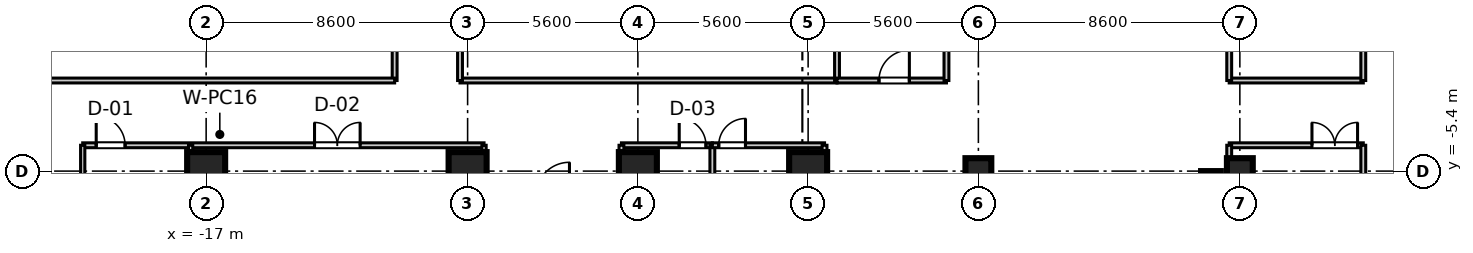
"""IFC4 building model, lengths in metres.
Left out: names, types, materials, properties, quantities, classifications, styles, units other than length and angle.
Written with IfcOpenShell. Run it as: python <this file> out.ifc"""

import sys

from ifc_helpers import new_model, si_unit, direction, frame, frame_2d, origin, origin_2d, place, context, subcontext, project, spatial, rectangle, extrude, source, transform, mapped, element, fill, save


model = new_model("IFC4")
c1 = context("Model", 3, precision=1e-05, world=origin(), true_north=direction((0.0, 1.0)))
c2 = subcontext(c1, "Body", "Model", "MODEL_VIEW")
j1 = project(units=[si_unit("LENGTHUNIT", "METRE"), si_unit("PLANEANGLEUNIT", "RADIAN")], contexts=[c1])
p1 = place(None, origin())
s1 = spatial("IfcSite", under=j1, at=p1, CompositionType="ELEMENT")
p2 = place(p1, origin())
s2 = spatial("IfcBuilding", under=s1, at=p2, CompositionType="ELEMENT")
p3 = place(p2, frame((0.0, 0.0, 110.2)))
s3 = spatial("IfcBuildingStorey", under=s2, at=p3, CompositionType="ELEMENT", Elevation=110.2)
m1 = source(origin(), c2, "Body", "SweptSolid", [
    extrude(rectangle(XDim=1.25, YDim=1.25, at=origin_2d()), origin(), (0.0, 0.0, 1.0), 3.605),
])
for number, where, z_axis, x_axis in (
    (1, (-17.0, -5.4, 0.0), (0.0, 0.0, 1.0), (1.0, 0.0, 0.0)),
    (2, (-8.4, -5.4, 0.0), (0.0, 0.0, 1.0), (1.0, 0.0, 0.0)),
    (3, (-2.8, -5.4, 0.0), (0.0, 0.0, 1.0), (1.0, 0.0, 0.0)),
    (4, (2.8, -5.4, 0.0), (0.0, 0.0, 1.0), (1.0, 0.0, 0.0)),
):
    element("IfcColumn", number, at=place(p3, frame(where, z_axis=z_axis, x_axis=x_axis)), inside=s3, PredefinedType="COLUMN", context=c2, shape_type="MappedRepresentation", body=[
        mapped(m1, transform((0.0, 0.0, 0.0), scale=1.0)),
    ])
m2 = source(origin(), c2, "Body", "SweptSolid", [
    extrude(rectangle(XDim=0.85, YDim=0.85, at=origin_2d()), origin(), (0.0, 0.0, 1.0), 3.605),
])
for number, where, z_axis, x_axis in (
    (5, (8.4, -5.4, 0.0), (0.0, 0.0, 1.0), (1.0, 0.0, 0.0)),
    (6, (17.0, -5.4, 0.0), (0.0, 0.0, 1.0), (1.0, 0.0, 0.0)),
):
    element("IfcColumn", number, at=place(p3, frame(where, z_axis=z_axis, x_axis=x_axis)), inside=s3, PredefinedType="PILASTER", context=c2, shape_type="MappedRepresentation", body=[
        mapped(m2, transform((0.0, 0.0, 0.0), scale=1.0)),
    ])
m3 = source(origin(), c2, "Body", "SweptSolid", [
    extrude(rectangle(XDim=11.6, YDim=0.65, at=frame_2d((5.8, 0.0))), origin(), (0.0, 0.0, 1.0), 3.38),
])
p4 = place(p3, frame((16.05, -17.0, 0.0), z_axis=(0.0, 0.0, 1.0), x_axis=(0.0, 1.0, 0.0)))
e7 = element("IfcWall", 7, at=p4, inside=s3, PredefinedType="SHEAR", context=c2, shape_type="MappedRepresentation", body=[
    mapped(m3, transform((0.0, 0.0, 0.0), scale=1.0)),
])
m4 = source(origin(), c2, "Body", "SweptSolid", [
    extrude(rectangle(XDim=4.41, YDim=0.16, at=frame_2d((2.205, 0.0))), origin(), (0.0, 0.0, 1.0), 2.72),
])
p5 = place(p3, frame((16.65, -4.55, 0.0), z_axis=(0.0, 0.0, 1.0), x_axis=(1.0, 0.0, 0.0)))
e8 = element("IfcWall", 8, at=p5, inside=s3, PredefinedType="PARTITIONING", context=c2, shape_type="MappedRepresentation", body=[
    mapped(m4, transform((0.0, 0.0, 0.0), scale=1.0)),
])
p6 = place(p5, frame((2.722, 0.0, 0.0)))
e9 = element("IfcOpeningElement", 9, at=p6, cuts=e8, PredefinedType="OPENING", context=c2, shape_type="SweptSolid", body=[
    extrude(rectangle(XDim=1.5, YDim=2.15, at=frame_2d((0.75, 1.075))), frame((0.0, 0.09, 0.0), z_axis=(0.0, -1.0, 0.0), x_axis=(1.0, 0.0, 0.0)), (0.0, 0.0, 1.0), 0.18),
])
m5 = source(origin(), c2, "Body", "SweptSolid", [
    extrude(rectangle(XDim=19.25, YDim=0.16, at=frame_2d((9.625, 0.0))), origin(), (0.0, 0.0, 1.0), 2.72),
])
p7 = place(p3, frame((16.65, -23.8, 0.0), z_axis=(0.0, 0.0, 1.0), x_axis=(0.0, 1.0, 0.0)))
e10 = element("IfcWall", 10, at=p7, inside=s3, PredefinedType="PARTITIONING", context=c2, shape_type="MappedRepresentation", body=[
    mapped(m5, transform((0.0, 0.0, 0.0), scale=1.0)),
])
m6 = source(origin(), c2, "Body", "SweptSolid", [
    extrude(rectangle(XDim=17.83, YDim=0.16, at=frame_2d((8.915, 0.0))), origin(), (0.0, 0.0, 1.0), 2.72),
])
p8 = place(p3, frame((21.06, -22.38, 0.0), z_axis=(0.0, 0.0, 1.0), x_axis=(0.0, 1.0, 0.0)))
e11 = element("IfcWall", 11, at=p8, inside=s3, PredefinedType="PARTITIONING", context=c2, shape_type="MappedRepresentation", body=[
    mapped(m6, transform((0.0, 0.0, 0.0), scale=1.0)),
])
m7 = source(origin(), c2, "Body", "SweptSolid", [
    extrude(rectangle(XDim=13.2, YDim=0.16, at=frame_2d((6.6, 0.0))), origin(), (0.0, 0.0, 1.0), 2.72),
])
p9 = place(p3, frame((-21.06, -4.55, 0.0), z_axis=(0.0, 0.0, 1.0), x_axis=(1.0, 0.0, 0.0)))
e12 = element("IfcWall", 12, at=p9, inside=s3, PredefinedType="PARTITIONING", context=c2, shape_type="MappedRepresentation", body=[
    mapped(m7, transform((0.0, 0.0, 0.0), scale=1.0)),
])
p10 = place(p9, frame((0.444, 0.0, 0.0)))
e13 = element("IfcOpeningElement", 13, at=p10, cuts=e12, PredefinedType="OPENING", context=c2, shape_type="SweptSolid", body=[
    extrude(rectangle(XDim=0.95, YDim=2.1, at=frame_2d((0.475, 1.05))), frame((0.0, 0.09, 0.0), z_axis=(0.0, -1.0, 0.0), x_axis=(1.0, 0.0, 0.0)), (0.0, 0.0, 1.0), 0.18),
])
p11 = place(p9, frame((7.625, 0.0, 0.0)))
e14 = element("IfcOpeningElement", 14, at=p11, cuts=e12, PredefinedType="OPENING", context=c2, shape_type="SweptSolid", body=[
    extrude(rectangle(XDim=1.5, YDim=2.15, at=frame_2d((0.75, 1.075))), frame((0.0, 0.09, 0.0), z_axis=(0.0, -1.0, 0.0), x_axis=(1.0, 0.0, 0.0)), (0.0, 0.0, 1.0), 0.18),
])
m8 = source(origin(), c2, "Body", "SweptSolid", [
    extrude(rectangle(XDim=17.83, YDim=0.14, at=frame_2d((8.915, 0.0))), origin(), (0.0, 0.0, 1.0), 2.72),
])
p12 = place(p3, frame((-21.06, -22.38, 0.0), z_axis=(0.0, 0.0, 1.0), x_axis=(0.0, 1.0, 0.0)))
e15 = element("IfcWall", 15, at=p12, inside=s3, PredefinedType="PARTITIONING", context=c2, shape_type="MappedRepresentation", body=[
    mapped(m8, transform((0.0, 0.0, 0.0), scale=1.0)),
])
m9 = source(origin(), c2, "Body", "SweptSolid", [
    extrude(rectangle(XDim=19.25, YDim=0.14, at=frame_2d((9.625, 0.0))), origin(), (0.0, 0.0, 1.0), 2.72),
])
for number, where, z_axis, x_axis in (
    (16, (-7.86, -23.8, 0.0), (0.0, 0.0, 1.0), (0.0, 1.0, 0.0)),
    (17, (-17.51, -23.8, 0.0), (0.0, 0.0, 1.0), (0.0, 1.0, 0.0)),
):
    element("IfcWall", number, at=place(p3, frame(where, z_axis=z_axis, x_axis=x_axis)), inside=s3, PredefinedType="PARTITIONING", context=c2, shape_type="MappedRepresentation", body=[
        mapped(m9, transform((0.0, 0.0, 0.0), scale=1.0)),
    ])
m10 = source(origin(), c2, "Body", "SweptSolid", [
    extrude(rectangle(XDim=2.99, YDim=0.16, at=frame_2d((1.495, 0.0))), origin(), (0.0, 0.0, 1.0), 2.72),
])
p13 = place(p3, frame((-3.34, -4.55, 0.0), z_axis=(0.0, 0.0, 1.0), x_axis=(1.0, 0.0, 0.0)))
e18 = element("IfcWall", 18, at=p13, inside=s3, PredefinedType="PARTITIONING", context=c2, shape_type="MappedRepresentation", body=[
    mapped(m10, transform((0.0, 0.0, 0.0), scale=1.0)),
])
p14 = place(p13, frame((1.9, 0.0, 0.0)))
e19 = element("IfcOpeningElement", 19, at=p14, cuts=e18, PredefinedType="OPENING", context=c2, shape_type="SweptSolid", body=[
    extrude(rectangle(XDim=0.88, YDim=2.1, at=frame_2d((0.44, 1.05))), frame((0.0, 0.09, 0.0), z_axis=(0.0, -1.0, 0.0), x_axis=(1.0, 0.0, 0.0)), (0.0, 0.0, 1.0), 0.18),
])
for number, where, z_axis, x_axis in (
    (20, (-3.34, -23.8, 0.0), (0.0, 0.0, 1.0), (0.0, 1.0, 0.0)),
    (21, (-0.35, -23.8, 0.0), (0.0, 0.0, 1.0), (0.0, 1.0, 0.0)),
):
    element("IfcWall", number, at=place(p3, frame(where, z_axis=z_axis, x_axis=x_axis)), inside=s3, PredefinedType="PARTITIONING", context=c2, shape_type="MappedRepresentation", body=[
        mapped(m5, transform((0.0, 0.0, 0.0), scale=1.0)),
    ])
m11 = source(origin(), c2, "Body", "SweptSolid", [
    extrude(rectangle(XDim=3.69, YDim=0.16, at=frame_2d((1.845, 0.0))), origin(), (0.0, 0.0, 1.0), 2.72),
])
p15 = place(p3, frame((-0.35, -4.55, 0.0), z_axis=(0.0, 0.0, 1.0), x_axis=(1.0, 0.0, 0.0)))
e22 = element("IfcWall", 22, at=p15, inside=s3, PredefinedType="PARTITIONING", context=c2, shape_type="MappedRepresentation", body=[
    mapped(m11, transform((0.0, 0.0, 0.0), scale=1.0)),
])
p16 = place(p15, frame((0.21, 0.0, 0.0)))
e23 = element("IfcOpeningElement", 23, at=p16, cuts=e22, PredefinedType="OPENING", context=c2, shape_type="SweptSolid", body=[
    extrude(rectangle(XDim=0.88, YDim=2.1, at=frame_2d((0.44, 1.05))), frame((0.0, 0.09, 0.0), z_axis=(0.0, -1.0, 0.0), x_axis=(1.0, 0.0, 0.0)), (0.0, 0.0, 1.0), 0.18),
])
p17 = place(p3, frame((3.34, -23.8, 0.0), z_axis=(0.0, 0.0, 1.0), x_axis=(0.0, 1.0, 0.0)))
e24 = element("IfcWall", 24, at=p17, inside=s3, PredefinedType="PARTITIONING", context=c2, shape_type="MappedRepresentation", body=[
    mapped(m5, transform((0.0, 0.0, 0.0), scale=1.0)),
])
m12 = source(origin(), c2, "Body", "SweptSolid", [
    extrude(rectangle(XDim=4.84, YDim=0.16, at=frame_2d((2.42, 0.0))), origin(), (0.0, 0.0, 1.0), 2.72),
])
p18 = place(p3, frame((-10.8, -2.42, 0.0), z_axis=(0.0, 0.0, 1.0), x_axis=(0.0, 1.0, 0.0)))
e25 = element("IfcWall", 25, at=p18, inside=s3, PredefinedType="PARTITIONING", context=c2, shape_type="MappedRepresentation", body=[
    mapped(m12, transform((0.0, 0.0, 0.0), scale=1.0)),
])
m13 = source(origin(), c2, "Body", "SweptSolid", [
    extrude(rectangle(XDim=13.0, YDim=0.16, at=frame_2d((6.5, 0.0))), origin(), (0.0, 0.0, 1.0), 2.72),
])
p19 = place(p3, frame((-23.8, -2.42, 0.0), z_axis=(0.0, 0.0, 1.0), x_axis=(1.0, 0.0, 0.0)))
e26 = element("IfcWall", 26, at=p19, inside=s3, PredefinedType="PARTITIONING", context=c2, shape_type="MappedRepresentation", body=[
    mapped(m13, transform((0.0, 0.0, 0.0), scale=1.0)),
])
m14 = source(origin(), c2, "Body", "SweptSolid", [
    extrude(rectangle(XDim=12.4, YDim=0.16, at=frame_2d((6.2, 0.0))), origin(), (0.0, 0.0, 1.0), 2.72),
])
p20 = place(p3, frame((-8.65, -2.42, 0.0), z_axis=(0.0, 0.0, 1.0), x_axis=(1.0, 0.0, 0.0)))
e27 = element("IfcWall", 27, at=p20, inside=s3, PredefinedType="PARTITIONING", context=c2, shape_type="MappedRepresentation", body=[
    mapped(m14, transform((0.0, 0.0, 0.0), scale=1.0)),
])
for number, where, z_axis, x_axis in (
    (28, (-8.65, -2.42, 0.0), (0.0, 0.0, 1.0), (0.0, 1.0, 0.0)),
    (29, (3.75, -2.42, 0.0), (0.0, 0.0, 1.0), (0.0, 1.0, 0.0)),
):
    element("IfcWall", number, at=place(p3, frame(where, z_axis=z_axis, x_axis=x_axis)), inside=s3, PredefinedType="PARTITIONING", context=c2, shape_type="MappedRepresentation", body=[
        mapped(m12, transform((0.0, 0.0, 0.0), scale=1.0)),
    ])
m15 = source(origin(), c2, "Body", "SweptSolid", [
    extrude(rectangle(XDim=3.6, YDim=0.16, at=frame_2d((1.8, 0.0))), origin(), (0.0, 0.0, 1.0), 2.72),
])
p21 = place(p3, frame((3.75, -2.42, 0.0), z_axis=(0.0, 0.0, 1.0), x_axis=(1.0, 0.0, 0.0)))
e30 = element("IfcWall", 30, at=p21, inside=s3, PredefinedType="PARTITIONING", context=c2, shape_type="MappedRepresentation", body=[
    mapped(m15, transform((0.0, 0.0, 0.0), scale=1.0)),
])
p22 = place(p21, frame((1.38, 0.0, 0.0)))
e31 = element("IfcOpeningElement", 31, at=p22, cuts=e30, PredefinedType="OPENING", context=c2, shape_type="SweptSolid", body=[
    extrude(rectangle(XDim=1.0, YDim=2.1, at=frame_2d((0.5, 1.05))), frame((0.0, 0.09, 0.0), z_axis=(0.0, -1.0, 0.0), x_axis=(1.0, 0.0, 0.0)), (0.0, 0.0, 1.0), 0.18),
])
p23 = place(p3, frame((7.35, -2.42, 0.0), z_axis=(0.0, 0.0, 1.0), x_axis=(0.0, 1.0, 0.0)))
e32 = element("IfcWall", 32, at=p23, inside=s3, PredefinedType="PARTITIONING", context=c2, shape_type="MappedRepresentation", body=[
    mapped(m12, transform((0.0, 0.0, 0.0), scale=1.0)),
])
p24 = place(p3, frame((16.65, -2.42, 0.0), z_axis=(0.0, 0.0, 1.0), x_axis=(1.0, 0.0, 0.0)))
e33 = element("IfcWall", 33, at=p24, inside=s3, PredefinedType="PARTITIONING", context=c2, shape_type="MappedRepresentation", body=[
    mapped(m4, transform((0.0, 0.0, 0.0), scale=1.0)),
])
for number, where, z_axis, x_axis in (
    (34, (16.65, -2.42, 0.0), (0.0, 0.0, 1.0), (0.0, 1.0, 0.0)),
    (35, (21.06, -2.42, 0.0), (0.0, 0.0, 1.0), (0.0, 1.0, 0.0)),
):
    element("IfcWall", number, at=place(p3, frame(where, z_axis=z_axis, x_axis=x_axis)), inside=s3, PredefinedType="PARTITIONING", context=c2, shape_type="MappedRepresentation", body=[
        mapped(m12, transform((0.0, 0.0, 0.0), scale=1.0)),
    ])
m16 = source(origin(), c2, "Body", "SweptSolid", [
    extrude(rectangle(XDim=1.5, YDim=2.15, at=frame_2d((0.75, 1.075))), frame((0.0, 0.025, 0.0), z_axis=(0.0, -1.0, 0.0), x_axis=(1.0, 0.0, 0.0)), (0.0, 0.0, 1.0), 0.05),
])
p25 = place(p6, frame((1.5, 0.0, 0.0), z_axis=(0.0, 0.0, 1.0), x_axis=(-1.0, 0.0, 0.0)))
e36 = element("IfcDoor", 36, at=p25, inside=s3, OperationType="DOUBLE_DOOR_SINGLE_SWING", PredefinedType="DOOR", context=c2, shape_type="MappedRepresentation", body=[
    mapped(m16, transform((0.0, 0.0, 0.0), scale=1.0)),
])
fill(e9, e36)
m17 = source(origin(), c2, "Body", "SweptSolid", [
    extrude(rectangle(XDim=0.95, YDim=2.1, at=frame_2d((0.475, 1.05))), frame((0.0, 0.025, 0.0), z_axis=(0.0, -1.0, 0.0), x_axis=(1.0, 0.0, 0.0)), (0.0, 0.0, 1.0), 0.05),
])
p26 = place(p10, frame((0.95, 0.0, 0.0), z_axis=(0.0, 0.0, 1.0), x_axis=(-1.0, 0.0, 0.0)))
e37 = element("IfcDoor", 37, at=p26, inside=s3, OperationType="SINGLE_SWING_LEFT", PredefinedType="DOOR", context=c2, shape_type="MappedRepresentation", body=[
    mapped(m17, transform((0.0, 0.0, 0.0), scale=1.0)),
])
fill(e13, e37)
p27 = place(p11, frame((1.5, 0.0, 0.0), z_axis=(0.0, 0.0, 1.0), x_axis=(-1.0, 0.0, 0.0)))
e38 = element("IfcDoor", 38, at=p27, inside=s3, OperationType="DOUBLE_DOOR_SINGLE_SWING", PredefinedType="DOOR", context=c2, shape_type="MappedRepresentation", body=[
    mapped(m16, transform((0.0, 0.0, 0.0), scale=1.0)),
])
fill(e14, e38)
m18 = source(origin(), c2, "Body", "SweptSolid", [
    extrude(rectangle(XDim=0.88, YDim=2.1, at=frame_2d((0.44, 1.05))), frame((0.0, 0.025, 0.0), z_axis=(0.0, -1.0, 0.0), x_axis=(1.0, 0.0, 0.0)), (0.0, 0.0, 1.0), 0.05),
])
p28 = place(p14, frame((0.88, 0.0, 0.0), z_axis=(0.0, 0.0, 1.0), x_axis=(-1.0, 0.0, 0.0)))
e39 = element("IfcDoor", 39, at=p28, inside=s3, OperationType="SINGLE_SWING_LEFT", PredefinedType="DOOR", context=c2, shape_type="MappedRepresentation", body=[
    mapped(m18, transform((0.0, 0.0, 0.0), scale=1.0)),
])
fill(e19, e39)
p29 = place(p16, frame((0.88, 0.0, 0.0), z_axis=(0.0, 0.0, 1.0), x_axis=(-1.0, 0.0, 0.0)))
e40 = element("IfcDoor", 40, at=p29, inside=s3, OperationType="SINGLE_SWING_RIGHT", PredefinedType="DOOR", context=c2, shape_type="MappedRepresentation", body=[
    mapped(m18, transform((0.0, 0.0, 0.0), scale=1.0)),
])
fill(e23, e40)
m19 = source(origin(), c2, "Body", "SweptSolid", [
    extrude(rectangle(XDim=1.0, YDim=2.1, at=frame_2d((0.5, 1.05))), frame((0.0, 0.025, 0.0), z_axis=(0.0, -1.0, 0.0), x_axis=(1.0, 0.0, 0.0)), (0.0, 0.0, 1.0), 0.05),
])
p30 = place(p22, origin())
e41 = element("IfcDoor", 41, at=p30, inside=s3, OperationType="SINGLE_SWING_RIGHT", PredefinedType="DOOR", context=c2, shape_type="MappedRepresentation", body=[
    mapped(m19, transform((0.0, 0.0, 0.0), scale=1.0)),
])
fill(e31, e41)
save(model, sys.argv[1])
